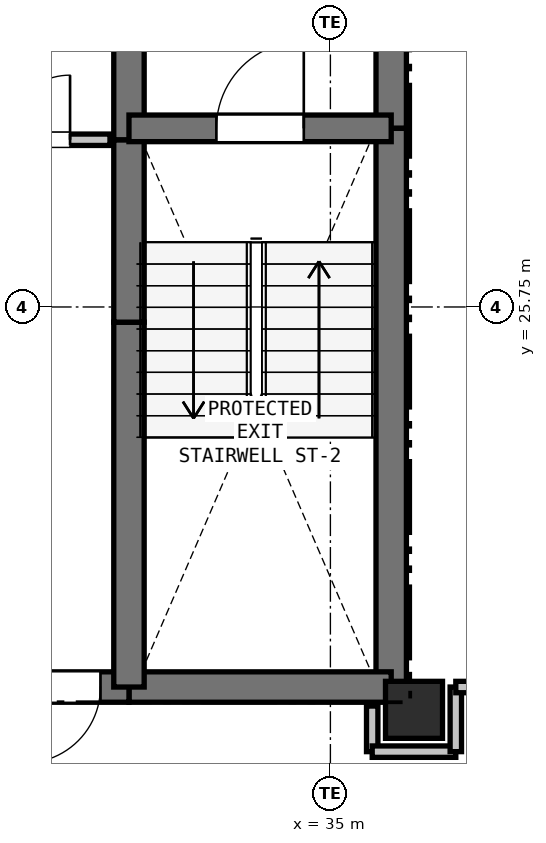
"""IFC4 building model, lengths in metres.
Left out: names, types, materials, properties, quantities, classifications, styles, units other than length and angle.
Written with IfcOpenShell. Run it as: python <this file> out.ifc"""

import sys

from ifc_helpers import new_model, si_unit, direction, frame, frame_2d, origin, origin_2d, place, context, subcontext, project, spatial, rectangle, extrude, element, fill, save


model = new_model("IFC4")
c1 = context("Model", 3, precision=1e-05, world=origin(), true_north=direction((0.0, 1.0)))
c2 = subcontext(c1, "Body", "Model", "MODEL_VIEW")
j1 = project(units=[si_unit("LENGTHUNIT", "METRE"), si_unit("PLANEANGLEUNIT", "RADIAN")], contexts=[c1])
p1 = place(None, origin())
s1 = spatial("IfcSite", under=j1, at=p1, CompositionType="ELEMENT")
p2 = place(p1, origin())
s2 = spatial("IfcBuilding", under=s1, at=p2, CompositionType="ELEMENT")
p3 = place(p2, frame((0.0, 0.0, 160.8)))
s3 = spatial("IfcBuildingStorey", under=s2, at=p3, CompositionType="ELEMENT", Elevation=160.8)
p4 = place(p3, frame((36.1, 20.45, 0.0), z_axis=(0.0, 0.0, 1.0), x_axis=(1.0, 0.0, 0.0)))
e1 = element("IfcColumn", 1, at=p4, inside=s3, PredefinedType="COLUMN", context=c2, shape_type="SweptSolid", body=[
    extrude(rectangle(XDim=0.75, YDim=0.75, at=origin_2d()), origin(), (0.0, 0.0, 1.0), 6.6),
])
p5 = place(p3, frame((8.31, 28.048, 0.0), z_axis=(0.0, 0.0, 1.0), x_axis=(0.866026432802, 0.499998217685, 0.0)))
e2 = element("IfcWall", 2, at=p5, inside=s3, PredefinedType="SOLIDWALL", context=c2, shape_type="SweptSolid", body=[
    extrude(rectangle(XDim=34.537, YDim=0.25, at=frame_2d((17.269, 0.0))), origin(), (0.0, 0.0, 1.0), 4.755),
])
p6 = place(p3, frame((38.22, 8.183, 0.0), z_axis=(0.0, 0.0, 1.0), x_axis=(-0.866026432802, 0.499998217685, 0.0)))
e3 = element("IfcWall", 3, at=p6, inside=s3, PredefinedType="SOLIDWALL", context=c2, shape_type="SweptSolid", body=[
    extrude(rectangle(XDim=34.537, YDim=0.25, at=frame_2d((17.269, 0.0))), origin(), (0.0, 0.0, 1.0), 5.005),
])
p7 = place(p3, frame((35.8, 32.75, 0.0), z_axis=(0.0, 0.0, 1.0), x_axis=(0.0, -1.0, 0.0)))
e4 = element("IfcWall", 4, at=p7, inside=s3, PredefinedType="SHEAR", context=c2, shape_type="SweptSolid", body=[
    extrude(rectangle(XDim=4.65, YDim=0.4, at=frame_2d((2.325, 0.0))), origin(), (0.0, 0.0, 1.0), 6.37),
])
p8 = place(p3, frame((35.8, 28.1, 0.0), z_axis=(0.0, 0.0, 1.0), x_axis=(0.0, -1.0, 0.0)))
e5 = element("IfcWall", 5, at=p8, inside=s3, PredefinedType="SHEAR", context=c2, shape_type="SweptSolid", body=[
    extrude(rectangle(XDim=7.35, YDim=0.4, at=frame_2d((3.675, 0.0))), origin(), (0.0, 0.0, 1.0), 6.37),
])
p9 = place(p3, frame((35.8, 20.75, 0.0), z_axis=(0.0, 0.0, 1.0), x_axis=(-1.0, 0.0, 0.0)))
e6 = element("IfcWall", 6, at=p9, inside=s3, PredefinedType="SHEAR", context=c2, shape_type="SweptSolid", body=[
    extrude(rectangle(XDim=3.45, YDim=0.4, at=frame_2d((1.725, 0.0))), origin(), (0.0, 0.0, 1.0), 6.37),
])
p10 = place(p3, frame((32.35, 20.75, 0.0), z_axis=(0.0, 0.0, 1.0), x_axis=(-1.0, 0.0, 0.0)))
e7 = element("IfcWall", 7, at=p10, inside=s3, PredefinedType="SHEAR", context=c2, shape_type="SweptSolid", body=[
    extrude(rectangle(XDim=1.75, YDim=0.4, at=frame_2d((0.875, 0.0))), origin(), (0.0, 0.0, 1.0), 6.37),
])
p11 = place(p10, frame((0.375, 0.0, 0.0)))
e8 = element("IfcOpeningElement", 8, at=p11, cuts=e7, PredefinedType="OPENING", context=c2, shape_type="SweptSolid", body=[
    extrude(rectangle(XDim=1.0, YDim=2.15, at=frame_2d((0.5, 1.075))), frame((0.0, 0.21, 0.0), z_axis=(0.0, -1.0, 0.0), x_axis=(1.0, 0.0, 0.0)), (0.0, 0.0, 1.0), 0.42),
])
p12 = place(p3, frame((32.35, 20.75, 0.0), z_axis=(0.0, 0.0, 1.0), x_axis=(0.0, 1.0, 0.0)))
e9 = element("IfcWall", 9, at=p12, inside=s3, PredefinedType="SHEAR", context=c2, shape_type="SweptSolid", body=[
    extrude(rectangle(XDim=4.8, YDim=0.4, at=frame_2d((2.4, 0.0))), origin(), (0.0, 0.0, 1.0), 6.37),
])
p13 = place(p3, frame((32.35, 25.55, 0.0), z_axis=(0.0, 0.0, 1.0), x_axis=(0.0, 1.0, 0.0)))
e10 = element("IfcWall", 10, at=p13, inside=s3, PredefinedType="SHEAR", context=c2, shape_type="SweptSolid", body=[
    extrude(rectangle(XDim=2.4, YDim=0.4, at=frame_2d((1.2, 0.0))), origin(), (0.0, 0.0, 1.0), 6.37),
])
p14 = place(p3, frame((32.35, 27.95, 0.0), z_axis=(0.0, 0.0, 1.0), x_axis=(0.0, 1.0, 0.0)))
e11 = element("IfcWall", 11, at=p14, inside=s3, PredefinedType="SHEAR", context=c2, shape_type="SweptSolid", body=[
    extrude(rectangle(XDim=2.8, YDim=0.4, at=frame_2d((1.4, 0.0))), origin(), (0.0, 0.0, 1.0), 6.37),
])
p15 = place(p3, frame((32.35, 28.1, 0.0), z_axis=(0.0, 0.0, 1.0), x_axis=(1.0, 0.0, 0.0)))
e12 = element("IfcWall", 12, at=p15, inside=s3, PredefinedType="SHEAR", context=c2, shape_type="SweptSolid", body=[
    extrude(rectangle(XDim=3.45, YDim=0.35, at=frame_2d((1.725, 0.0))), origin(), (0.0, 0.0, 1.0), 6.37),
])
p16 = place(p15, frame((1.15, 0.0, 0.0)))
e13 = element("IfcOpeningElement", 13, at=p16, cuts=e12, PredefinedType="OPENING", context=c2, shape_type="SweptSolid", body=[
    extrude(rectangle(XDim=1.15, YDim=2.15, at=frame_2d((0.575, 1.075))), frame((0.0, 0.185, 0.0), z_axis=(0.0, -1.0, 0.0), x_axis=(1.0, 0.0, 0.0)), (0.0, 0.0, 1.0), 0.37),
])
p17 = place(p3, frame((30.2, 27.95, 0.0), z_axis=(0.0, 0.0, 1.0), x_axis=(1.0, 0.0, 0.0)))
e14 = element("IfcWall", 14, at=p17, inside=s3, PredefinedType="PARTITIONING", context=c2, shape_type="SweptSolid", body=[
    extrude(rectangle(XDim=1.9, YDim=0.15, at=frame_2d((0.95, 0.0))), origin(), (0.0, 0.0, 1.0), 6.37),
])
p18 = place(p17, frame((0.525, 0.0, 0.0)))
e15 = element("IfcOpeningElement", 15, at=p18, cuts=e14, PredefinedType="OPENING", context=c2, shape_type="SweptSolid", body=[
    extrude(rectangle(XDim=0.85, YDim=2.1, at=frame_2d((0.425, 1.05))), frame((0.0, 0.085, 0.0), z_axis=(0.0, -1.0, 0.0), x_axis=(1.0, 0.0, 0.0)), (0.0, 0.0, 1.0), 0.17),
])
p19 = place(p3, frame((35.55, 20.5, 0.0), z_axis=(0.0, 0.0, 1.0), x_axis=(0.0, -1.0, 0.0)))
e16 = element("IfcWall", 16, at=p19, inside=s3, PredefinedType="PARTITIONING", context=c2, shape_type="SweptSolid", body=[
    extrude(rectangle(XDim=0.6, YDim=0.15, at=frame_2d((0.3, 0.0))), origin(), (0.0, 0.0, 1.0), 5.895),
])
p20 = place(p3, frame((35.55, 19.9, 0.0), z_axis=(0.0, 0.0, 1.0), x_axis=(1.0, 0.0, 0.0)))
e17 = element("IfcWall", 17, at=p20, inside=s3, PredefinedType="PARTITIONING", context=c2, shape_type="SweptSolid", body=[
    extrude(rectangle(XDim=1.1, YDim=0.15, at=frame_2d((0.55, 0.0))), origin(), (0.0, 0.0, 1.0), 6.37),
])
for number, where, z_axis, x_axis in (
    (18, (36.65, 19.9, 0.0), (0.0, 0.0, 1.0), (0.0, 1.0, 0.0)),
    (19, (36.65, 20.75, 0.0), (0.0, 0.0, 1.0), (1.0, 0.0, 0.0)),
):
    element("IfcWall", number, at=place(p3, frame(where, z_axis=z_axis, x_axis=x_axis)), inside=s3, PredefinedType="PARTITIONING", context=c2, shape_type="SweptSolid", body=[
        extrude(rectangle(XDim=0.85, YDim=0.15, at=frame_2d((0.425, 0.0))), origin(), (0.0, 0.0, 1.0), 6.37),
    ])
p21 = place(p11, origin())
e20 = element("IfcDoor", 20, at=p21, inside=s3, OperationType="SINGLE_SWING_RIGHT", PredefinedType="DOOR", context=c2, shape_type="SweptSolid", body=[
    extrude(rectangle(XDim=1.0, YDim=2.15, at=frame_2d((0.5, 1.075))), frame((0.0, 0.025, 0.0), z_axis=(0.0, -1.0, 0.0), x_axis=(1.0, 0.0, 0.0)), (0.0, 0.0, 1.0), 0.05),
])
fill(e8, e20)
p22 = place(p16, origin())
e21 = element("IfcDoor", 21, at=p22, inside=s3, OperationType="SINGLE_SWING_RIGHT", PredefinedType="DOOR", context=c2, shape_type="SweptSolid", body=[
    extrude(rectangle(XDim=1.15, YDim=2.15, at=frame_2d((0.575, 1.075))), frame((0.0, 0.025, 0.0), z_axis=(0.0, -1.0, 0.0), x_axis=(1.0, 0.0, 0.0)), (0.0, 0.0, 1.0), 0.05),
])
fill(e13, e21)
p23 = place(p18, origin())
e22 = element("IfcDoor", 22, at=p23, inside=s3, OperationType="SINGLE_SWING_RIGHT", PredefinedType="DOOR", context=c2, shape_type="SweptSolid", body=[
    extrude(rectangle(XDim=0.85, YDim=2.1, at=frame_2d((0.425, 1.05))), frame((0.0, 0.025, 0.0), z_axis=(0.0, -1.0, 0.0), x_axis=(1.0, 0.0, 0.0)), (0.0, 0.0, 1.0), 0.05),
])
fill(e15, e22)
save(model, sys.argv[1])
